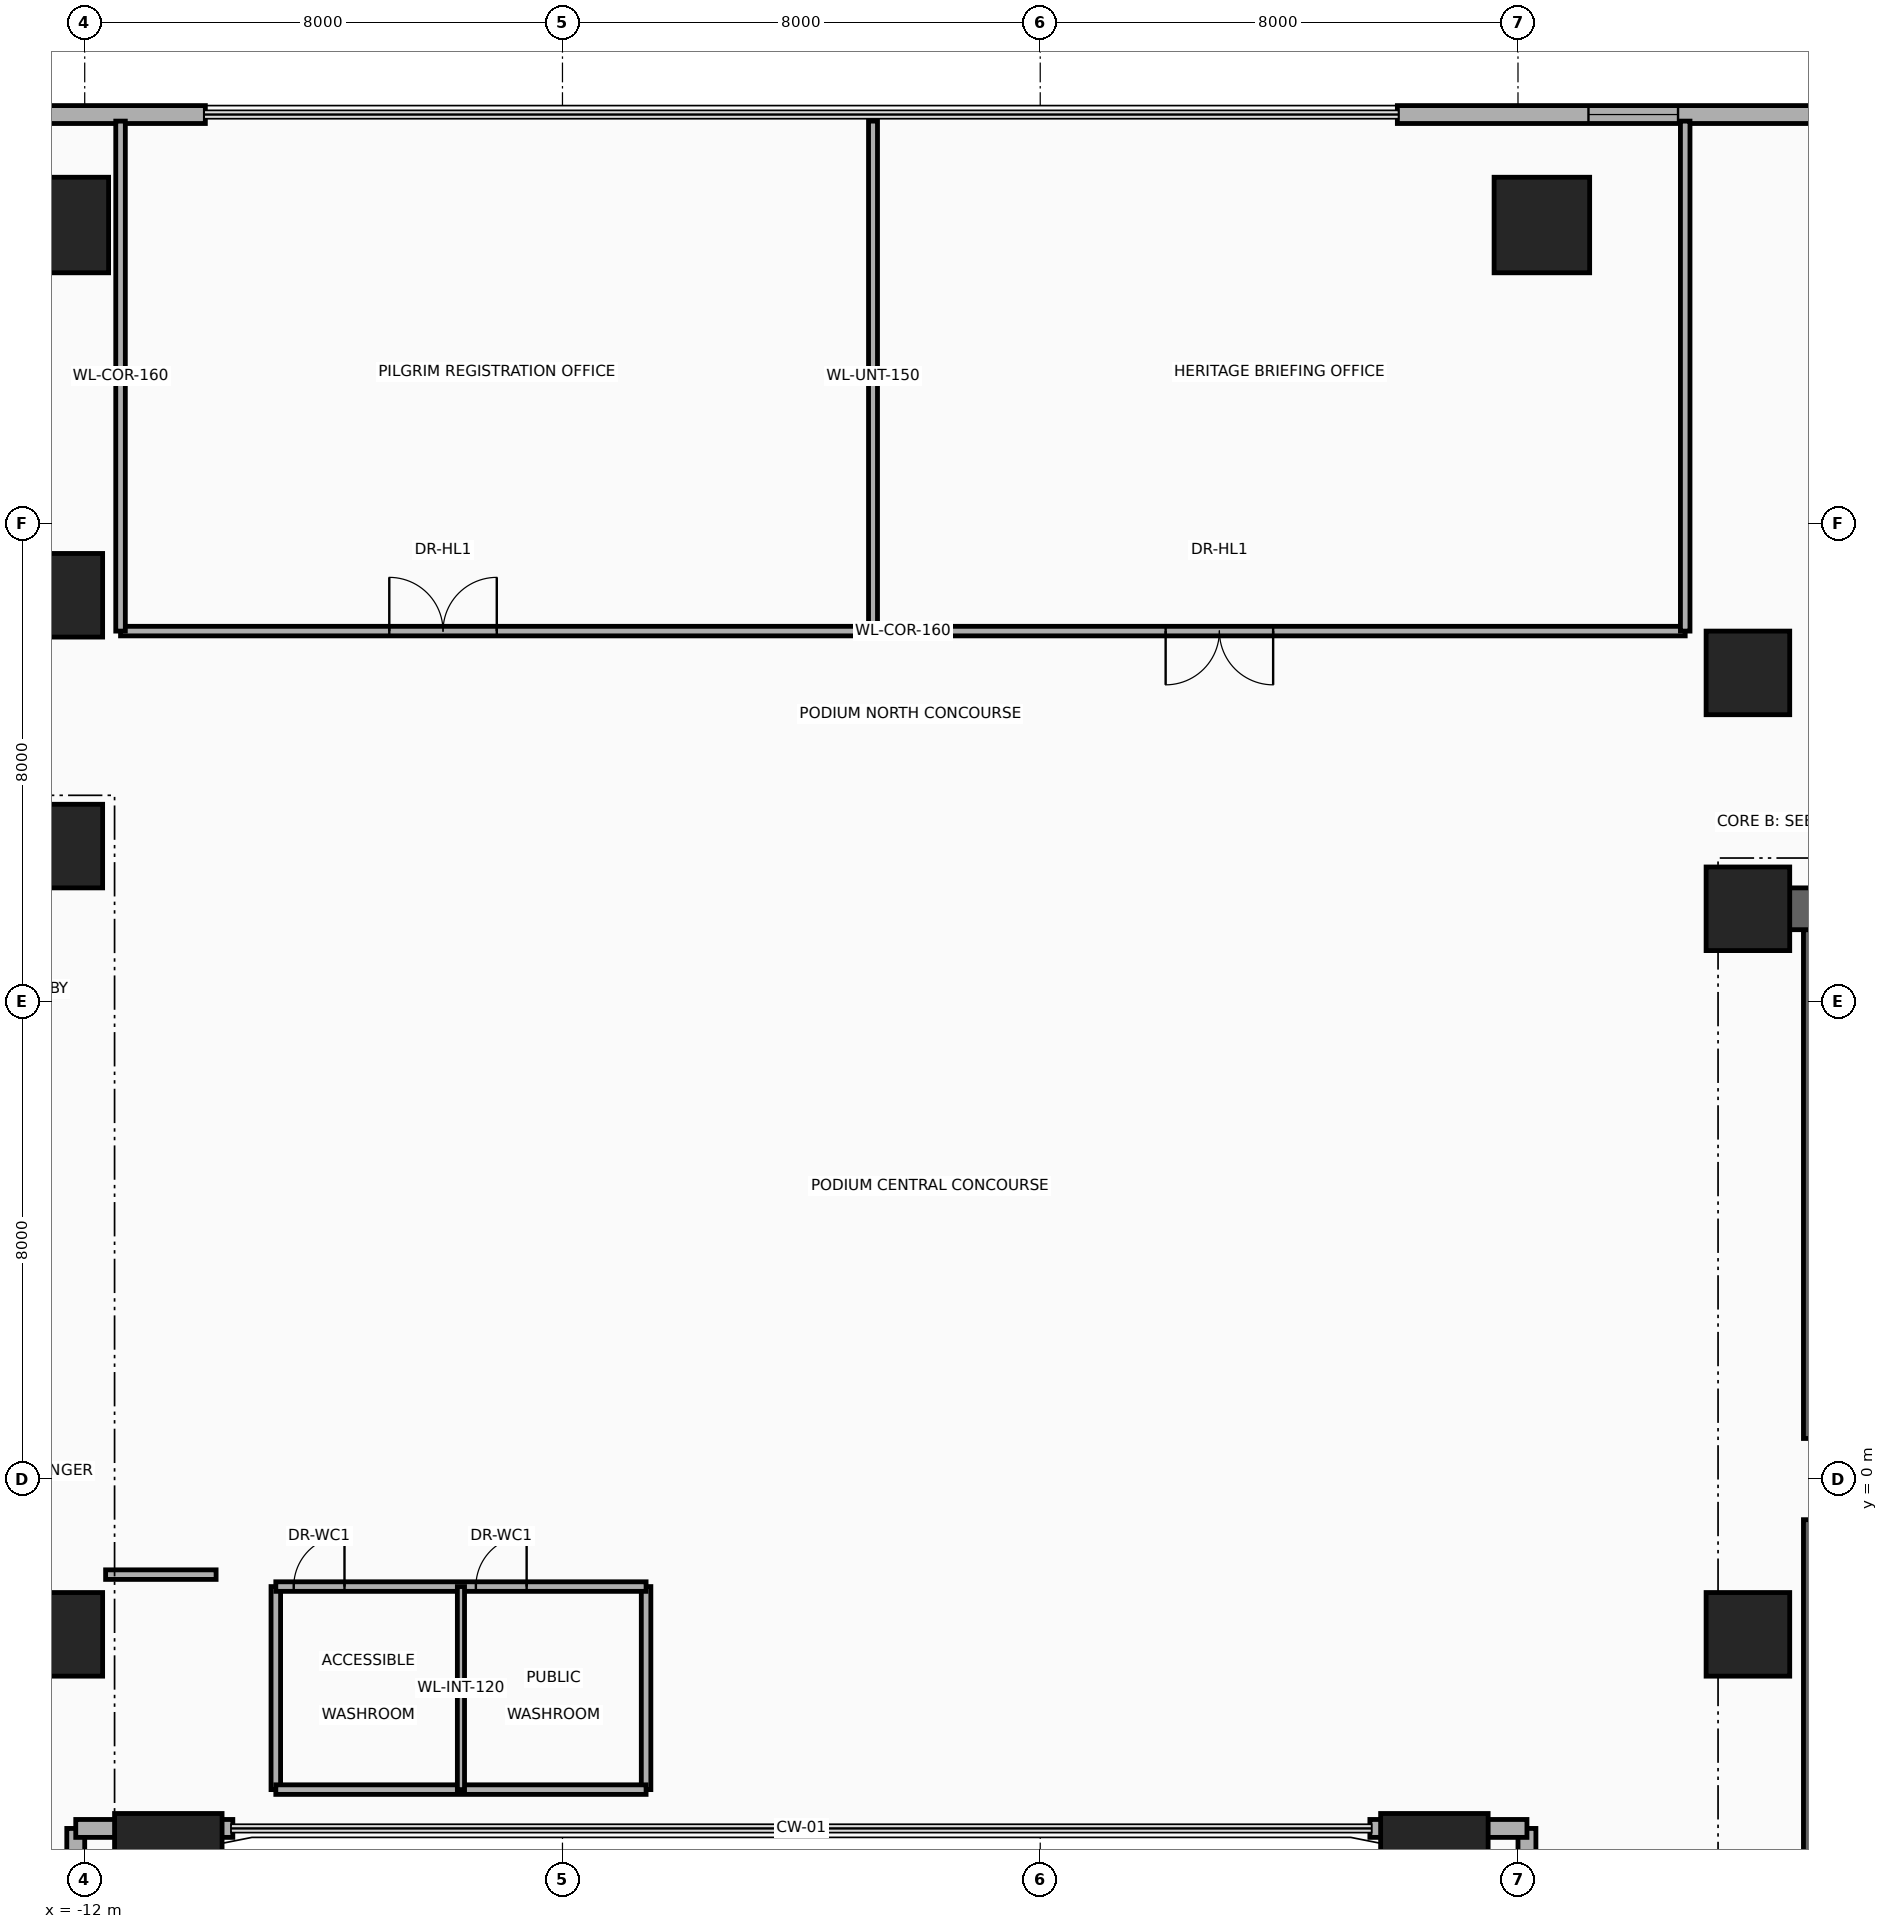
"""IFC4 building model, lengths in metres.
Left out: names, types, materials, properties, quantities, classifications, styles, units other than length and angle.
Written with IfcOpenShell. Run it as: python <this file> out.ifc"""

import sys

from ifc_helpers import new_model, si_unit, direction, frame, frame_2d, origin, origin_2d, place, context, subcontext, project, spatial, rectangle, extrude, source, transform, mapped, element, fill, save


model = new_model("IFC4")
c1 = context("Model", 3, precision=1e-05, world=origin(), true_north=direction((0.0, 1.0)))
c2 = subcontext(c1, "Body", "Model", "MODEL_VIEW")
j1 = project(units=[si_unit("LENGTHUNIT", "METRE"), si_unit("PLANEANGLEUNIT", "RADIAN")], contexts=[c1])
p1 = place(None, origin())
s1 = spatial("IfcSite", under=j1, at=p1, CompositionType="ELEMENT")
p2 = place(p1, origin())
s2 = spatial("IfcBuilding", under=s1, at=p2, CompositionType="ELEMENT")
p3 = place(p2, frame((0.0, 0.0, 5.2)))
s3 = spatial("IfcBuildingStorey", under=s2, at=p3, CompositionType="ELEMENT", Elevation=5.2)
for number, where, z_axis, x_axis in (
    (1, (16.89, 0.68, 0.0), (0.0, 0.0, 1.0), (0.0, 1.0, 0.0)),
    (2, (16.89, -9.2, 0.0), (0.0, 0.0, 1.0), (0.0, 1.0, 0.0)),
):
    element("IfcWall", number, at=place(p3, frame(where, z_axis=z_axis, x_axis=x_axis)), inside=s3, PredefinedType="SHEAR", context=c2, shape_type="SweptSolid", body=[
        extrude(rectangle(XDim=8.52, YDim=0.22, at=frame_2d((4.26, 0.0))), origin(), (0.0, 0.0, 1.0), 4.92),
    ])
p4 = place(p3, frame((-22.65, 10.8, 0.0), z_axis=(0.0, 0.0, 1.0), x_axis=(1.0, 0.0, 0.0)))
e3 = element("IfcWall", 3, at=p4, inside=s3, PredefinedType="SHEAR", context=c2, shape_type="SweptSolid", body=[
    extrude(rectangle(XDim=10.25, YDim=0.7, at=frame_2d((5.125, 0.0))), origin(), (0.0, 0.0, 1.0), 4.92),
])
p5 = place(p3, frame((15.85, 9.55, 0.0), z_axis=(0.0, 0.0, 1.0), x_axis=(1.0, 0.0, 0.0)))
e4 = element("IfcWall", 4, at=p5, inside=s3, PredefinedType="SHEAR", context=c2, shape_type="SweptSolid", body=[
    extrude(rectangle(XDim=9.0, YDim=0.7, at=frame_2d((4.5, 0.0))), origin(), (0.0, 0.0, 1.0), 4.92),
])
m1 = source(origin(), c2, "Body", "SweptSolid", [
    extrude(rectangle(XDim=1.4, YDim=1.4, at=origin_2d()), origin(), (0.0, 0.0, 1.0), 5.2),
])
for number, where, z_axis, x_axis in (
    (5, (-12.4, -2.6, 0.0), (0.0, 0.0, 1.0), (1.0, 0.0, 0.0)),
    (6, (-12.4, 10.6, 0.0), (0.0, 0.0, 1.0), (1.0, 0.0, 0.0)),
    (7, (-12.4, 14.8, 0.0), (0.0, 0.0, 1.0), (1.0, 0.0, 0.0)),
    (8, (15.85, -2.6, 0.0), (0.0, 0.0, 1.0), (1.0, 0.0, 0.0)),
    (9, (15.85, 9.55, 0.0), (0.0, 0.0, 1.0), (1.0, 0.0, 0.0)),
    (10, (15.85, 13.5, 0.0), (0.0, 0.0, 1.0), (1.0, 0.0, 0.0)),
):
    element("IfcColumn", number, at=place(p3, frame(where, z_axis=z_axis, x_axis=x_axis)), inside=s3, PredefinedType="COLUMN", context=c2, shape_type="MappedRepresentation", body=[
        mapped(m1, transform((0.0, 0.0, 0.0), x_axis=(1.0, 0.0, 0.0), y_axis=(0.0, 1.0, 0.0), z_axis=(0.0, 0.0, 1.0), scale=1.0)),
    ])
m2 = source(origin(), c2, "Body", "SweptSolid", [
    extrude(rectangle(XDim=1.8, YDim=1.8, at=origin_2d()), origin(), (0.0, 0.0, 1.0), 5.2),
])
for number, where, z_axis, x_axis in (
    (11, (-10.6, -6.5, 0.0), (0.0, 0.0, 1.0), (1.0, 0.0, 0.0)),
    (12, (10.6, -6.5, 0.0), (0.0, 0.0, 1.0), (1.0, 0.0, 0.0)),
):
    element("IfcColumn", number, at=place(p3, frame(where, z_axis=z_axis, x_axis=x_axis)), inside=s3, PredefinedType="COLUMN", context=c2, shape_type="MappedRepresentation", body=[
        mapped(m2, transform((0.0, 0.0, 0.0), x_axis=(1.0, 0.0, 0.0), y_axis=(0.0, 1.0, 0.0), z_axis=(0.0, 0.0, 1.0), scale=1.0)),
    ])
m3 = source(origin(), c2, "Body", "SweptSolid", [
    extrude(rectangle(XDim=1.6, YDim=1.6, at=origin_2d()), origin(), (0.0, 0.0, 1.0), 5.2),
])
for number, where, z_axis, x_axis in (
    (13, (-12.4, 21.0, 0.0), (0.0, 0.0, 1.0), (1.0, 0.0, 0.0)),
    (14, (12.4, 21.0, 0.0), (0.0, 0.0, 1.0), (1.0, 0.0, 0.0)),
):
    element("IfcColumn", number, at=place(p3, frame(where, z_axis=z_axis, x_axis=x_axis)), inside=s3, PredefinedType="COLUMN", context=c2, shape_type="MappedRepresentation", body=[
        mapped(m3, transform((0.0, 0.0, 0.0), x_axis=(1.0, 0.0, 0.0), y_axis=(0.0, 1.0, 0.0), z_axis=(0.0, 0.0, 1.0), scale=1.0)),
    ])
p6 = place(p3, frame((-33.85, 22.85, 0.0), z_axis=(0.0, 0.0, 1.0), x_axis=(1.0, 0.0, 0.0)))
e15 = element("IfcWall", 15, at=p6, inside=s3, PredefinedType="SOLIDWALL", context=c2, shape_type="SweptSolid", body=[
    extrude(rectangle(XDim=23.87, YDim=0.3, at=frame_2d((11.935, 0.0))), origin(), (0.0, 0.0, 1.0), 4.92),
])
p7 = place(p6, frame((3.2, 0.0, 0.9)))
e16 = element("IfcOpeningElement", 16, at=p7, cuts=e15, PredefinedType="OPENING", context=c2, shape_type="SweptSolid", body=[
    extrude(rectangle(XDim=1.5, YDim=1.75, at=frame_2d((0.75, 0.875))), frame((0.0, 0.165, 0.0), z_axis=(0.0, -1.0, 0.0), x_axis=(1.0, 0.0, 0.0)), (0.0, 0.0, 1.0), 0.33),
])
p8 = place(p6, frame((10.0, 0.0, 0.9)))
e17 = element("IfcOpeningElement", 17, at=p8, cuts=e15, PredefinedType="OPENING", context=c2, shape_type="SweptSolid", body=[
    extrude(rectangle(XDim=1.5, YDim=1.75, at=frame_2d((0.75, 0.875))), frame((0.0, 0.165, 0.0), z_axis=(0.0, -1.0, 0.0), x_axis=(1.0, 0.0, 0.0)), (0.0, 0.0, 1.0), 0.33),
])
p9 = place(p6, frame((17.8, 0.0, 0.9)))
e18 = element("IfcOpeningElement", 18, at=p9, cuts=e15, PredefinedType="OPENING", context=c2, shape_type="SweptSolid", body=[
    extrude(rectangle(XDim=1.5, YDim=1.75, at=frame_2d((0.75, 0.875))), frame((0.0, 0.165, 0.0), z_axis=(0.0, -1.0, 0.0), x_axis=(1.0, 0.0, 0.0)), (0.0, 0.0, 1.0), 0.33),
])
p10 = place(p3, frame((9.98, 22.85, 0.0), z_axis=(0.0, 0.0, 1.0), x_axis=(1.0, 0.0, 0.0)))
e19 = element("IfcWall", 19, at=p10, inside=s3, PredefinedType="SOLIDWALL", context=c2, shape_type="SweptSolid", body=[
    extrude(rectangle(XDim=23.87, YDim=0.3, at=frame_2d((11.935, 0.0))), origin(), (0.0, 0.0, 1.0), 4.92),
])
p11 = place(p10, frame((3.2, 0.0, 0.9)))
e20 = element("IfcOpeningElement", 20, at=p11, cuts=e19, PredefinedType="OPENING", context=c2, shape_type="SweptSolid", body=[
    extrude(rectangle(XDim=1.5, YDim=1.75, at=frame_2d((0.75, 0.875))), frame((0.0, 0.165, 0.0), z_axis=(0.0, -1.0, 0.0), x_axis=(1.0, 0.0, 0.0)), (0.0, 0.0, 1.0), 0.33),
])
p12 = place(p10, frame((10.0, 0.0, 0.9)))
e21 = element("IfcOpeningElement", 21, at=p12, cuts=e19, PredefinedType="OPENING", context=c2, shape_type="SweptSolid", body=[
    extrude(rectangle(XDim=1.5, YDim=1.75, at=frame_2d((0.75, 0.875))), frame((0.0, 0.165, 0.0), z_axis=(0.0, -1.0, 0.0), x_axis=(1.0, 0.0, 0.0)), (0.0, 0.0, 1.0), 0.33),
])
p13 = place(p10, frame((17.8, 0.0, 0.9)))
e22 = element("IfcOpeningElement", 22, at=p13, cuts=e19, PredefinedType="OPENING", context=c2, shape_type="SweptSolid", body=[
    extrude(rectangle(XDim=1.5, YDim=1.75, at=frame_2d((0.75, 0.875))), frame((0.0, 0.165, 0.0), z_axis=(0.0, -1.0, 0.0), x_axis=(1.0, 0.0, 0.0)), (0.0, 0.0, 1.0), 0.33),
])
for number, where, z_axis, x_axis in (
    (23, (-12.15, -22.85, 0.0), (0.0, 0.0, 1.0), (0.0, 1.0, 0.0)),
    (24, (12.15, -22.85, 0.0), (0.0, 0.0, 1.0), (0.0, 1.0, 0.0)),
):
    element("IfcWall", number, at=place(p3, frame(where, z_axis=z_axis, x_axis=x_axis)), inside=s3, PredefinedType="SOLIDWALL", context=c2, shape_type="SweptSolid", body=[
        extrude(rectangle(XDim=17.0, YDim=0.3, at=frame_2d((8.5, 0.0))), origin(), (0.0, 0.0, 1.0), 3.957),
    ])
for number, where, z_axis, x_axis in (
    (25, (-12.15, -5.85, 0.0), (0.0, 0.0, 1.0), (1.0, 0.0, 0.0)),
    (26, (9.52, -5.85, 0.0), (0.0, 0.0, 1.0), (1.0, 0.0, 0.0)),
):
    element("IfcWall", number, at=place(p3, frame(where, z_axis=z_axis, x_axis=x_axis)), inside=s3, PredefinedType="SOLIDWALL", context=c2, shape_type="SweptSolid", body=[
        extrude(rectangle(XDim=2.63, YDim=0.3, at=frame_2d((1.315, 0.0))), origin(), (0.0, 0.0, 1.0), 4.92),
    ])
p14 = place(p3, frame((-11.4, 14.2, 0.0), z_axis=(0.0, 0.0, 1.0), x_axis=(1.0, 0.0, 0.0)))
e27 = element("IfcWall", 27, at=p14, inside=s3, PredefinedType="PARTITIONING", context=c2, shape_type="SweptSolid", body=[
    extrude(rectangle(XDim=26.2, YDim=0.16, at=frame_2d((13.1, 0.0))), origin(), (0.0, 0.0, 1.0), 4.92),
])
p15 = place(p14, frame((4.5, 0.0, 0.0)))
e28 = element("IfcOpeningElement", 28, at=p15, cuts=e27, PredefinedType="OPENING", context=c2, shape_type="SweptSolid", body=[
    extrude(rectangle(XDim=1.8, YDim=2.15, at=frame_2d((0.9, 1.075))), frame((0.0, 0.095, 0.0), z_axis=(0.0, -1.0, 0.0), x_axis=(1.0, 0.0, 0.0)), (0.0, 0.0, 1.0), 0.19),
])
p16 = place(p14, frame((17.5, 0.0, 0.0)))
e29 = element("IfcOpeningElement", 29, at=p16, cuts=e27, PredefinedType="OPENING", context=c2, shape_type="SweptSolid", body=[
    extrude(rectangle(XDim=1.8, YDim=2.15, at=frame_2d((0.9, 1.075))), frame((0.0, 0.095, 0.0), z_axis=(0.0, -1.0, 0.0), x_axis=(1.0, 0.0, 0.0)), (0.0, 0.0, 1.0), 0.19),
])
for number, where, z_axis, x_axis in (
    (30, (-11.4, 14.2, 0.0), (0.0, 0.0, 1.0), (0.0, 1.0, 0.0)),
    (31, (14.8, 14.2, 0.0), (0.0, 0.0, 1.0), (0.0, 1.0, 0.0)),
):
    element("IfcWall", number, at=place(p3, frame(where, z_axis=z_axis, x_axis=x_axis)), inside=s3, PredefinedType="PARTITIONING", context=c2, shape_type="SweptSolid", body=[
        extrude(rectangle(XDim=8.54, YDim=0.16, at=frame_2d((4.27, 0.0))), origin(), (0.0, 0.0, 1.0), 3.957),
    ])
p17 = place(p3, frame((1.2, 14.2, 0.0), z_axis=(0.0, 0.0, 1.0), x_axis=(0.0, 1.0, 0.0)))
e32 = element("IfcWall", 32, at=p17, inside=s3, PredefinedType="PARTITIONING", context=c2, shape_type="SweptSolid", body=[
    extrude(rectangle(XDim=8.54, YDim=0.15, at=frame_2d((4.27, 0.0))), origin(), (0.0, 0.0, 1.0), 3.957),
])
for number, where, z_axis, x_axis in (
    (33, (-8.8, -5.2, 0.0), (0.0, 0.0, 1.0), (0.0, 1.0, 0.0)),
    (34, (-2.6, -5.2, 0.0), (0.0, 0.0, 1.0), (0.0, 1.0, 0.0)),
):
    element("IfcWall", number, at=place(p3, frame(where, z_axis=z_axis, x_axis=x_axis)), inside=s3, PredefinedType="PARTITIONING", context=c2, shape_type="SweptSolid", body=[
        extrude(rectangle(XDim=3.4, YDim=0.16, at=frame_2d((1.7, 0.0))), origin(), (0.0, 0.0, 1.0), 4.92),
    ])
p18 = place(p3, frame((-8.8, -5.2, 0.0), z_axis=(0.0, 0.0, 1.0), x_axis=(1.0, 0.0, 0.0)))
e35 = element("IfcWall", 35, at=p18, inside=s3, PredefinedType="PARTITIONING", context=c2, shape_type="SweptSolid", body=[
    extrude(rectangle(XDim=6.2, YDim=0.16, at=frame_2d((3.1, 0.0))), origin(), (0.0, 0.0, 1.0), 4.92),
])
p19 = place(p3, frame((-8.8, -1.8, 0.0), z_axis=(0.0, 0.0, 1.0), x_axis=(1.0, 0.0, 0.0)))
e36 = element("IfcWall", 36, at=p19, inside=s3, PredefinedType="PARTITIONING", context=c2, shape_type="SweptSolid", body=[
    extrude(rectangle(XDim=6.2, YDim=0.16, at=frame_2d((3.1, 0.0))), origin(), (0.0, 0.0, 1.0), 4.92),
])
p20 = place(p19, frame((0.3, 0.0, 0.0)))
e37 = element("IfcOpeningElement", 37, at=p20, cuts=e36, PredefinedType="OPENING", context=c2, shape_type="SweptSolid", body=[
    extrude(rectangle(XDim=0.85, YDim=2.1, at=frame_2d((0.425, 1.05))), frame((0.0, 0.095, 0.0), z_axis=(0.0, -1.0, 0.0), x_axis=(1.0, 0.0, 0.0)), (0.0, 0.0, 1.0), 0.19),
])
p21 = place(p19, frame((3.35, 0.0, 0.0)))
e38 = element("IfcOpeningElement", 38, at=p21, cuts=e36, PredefinedType="OPENING", context=c2, shape_type="SweptSolid", body=[
    extrude(rectangle(XDim=0.85, YDim=2.1, at=frame_2d((0.425, 1.05))), frame((0.0, 0.095, 0.0), z_axis=(0.0, -1.0, 0.0), x_axis=(1.0, 0.0, 0.0)), (0.0, 0.0, 1.0), 0.19),
])
p22 = place(p3, frame((-5.7, -5.2, 0.0), z_axis=(0.0, 0.0, 1.0), x_axis=(0.0, 1.0, 0.0)))
e39 = element("IfcWall", 39, at=p22, inside=s3, PredefinedType="PARTITIONING", context=c2, shape_type="SweptSolid", body=[
    extrude(rectangle(XDim=3.4, YDim=0.12, at=frame_2d((1.7, 0.0))), origin(), (0.0, 0.0, 1.0), 4.92),
])
p23 = place(p3, frame((-11.65, -1.6, 0.0), z_axis=(0.0, 0.0, 1.0), x_axis=(1.0, 0.0, 0.0)))
e40 = element("IfcWall", 40, at=p23, inside=s3, PredefinedType="PARTITIONING", context=c2, shape_type="SweptSolid", body=[
    extrude(rectangle(XDim=1.85, YDim=0.16, at=frame_2d((0.925, 0.0))), origin(), (0.0, 0.0, 1.0), 4.92),
])
p24 = place(p11, origin())
e41 = element("IfcWindow", 41, at=p24, inside=s3, PartitioningType="SINGLE_PANEL", PredefinedType="WINDOW", context=c2, shape_type="SweptSolid", body=[
    extrude(rectangle(XDim=1.5, YDim=1.75, at=frame_2d((0.75, 0.875))), frame((0.0, 0.03, 0.0), z_axis=(0.0, -1.0, 0.0), x_axis=(1.0, 0.0, 0.0)), (0.0, 0.0, 1.0), 0.06),
])
fill(e20, e41)
p25 = place(p15, origin())
e42 = element("IfcDoor", 42, at=p25, inside=s3, OperationType="DOUBLE_DOOR_SINGLE_SWING", PredefinedType="DOOR", context=c2, shape_type="SweptSolid", body=[
    extrude(rectangle(XDim=1.8, YDim=2.15, at=frame_2d((0.9, 1.075))), frame((0.0, 0.025, 0.0), z_axis=(0.0, -1.0, 0.0), x_axis=(1.0, 0.0, 0.0)), (0.0, 0.0, 1.0), 0.05),
])
fill(e28, e42)
p26 = place(p16, frame((1.8, 0.0, 0.0), z_axis=(0.0, 0.0, 1.0), x_axis=(-1.0, 0.0, 0.0)))
e43 = element("IfcDoor", 43, at=p26, inside=s3, OperationType="DOUBLE_DOOR_SINGLE_SWING", PredefinedType="DOOR", context=c2, shape_type="SweptSolid", body=[
    extrude(rectangle(XDim=1.8, YDim=2.15, at=frame_2d((0.9, 1.075))), frame((0.0, 0.025, 0.0), z_axis=(0.0, -1.0, 0.0), x_axis=(1.0, 0.0, 0.0)), (0.0, 0.0, 1.0), 0.05),
])
fill(e29, e43)
p27 = place(p20, origin())
e44 = element("IfcDoor", 44, at=p27, inside=s3, OperationType="SINGLE_SWING_RIGHT", PredefinedType="DOOR", context=c2, shape_type="SweptSolid", body=[
    extrude(rectangle(XDim=0.85, YDim=2.1, at=frame_2d((0.425, 1.05))), frame((0.0, 0.025, 0.0), z_axis=(0.0, -1.0, 0.0), x_axis=(1.0, 0.0, 0.0)), (0.0, 0.0, 1.0), 0.05),
])
fill(e37, e44)
p28 = place(p21, origin())
e45 = element("IfcDoor", 45, at=p28, inside=s3, OperationType="SINGLE_SWING_LEFT", PredefinedType="DOOR", context=c2, shape_type="SweptSolid", body=[
    extrude(rectangle(XDim=0.85, YDim=2.1, at=frame_2d((0.425, 1.05))), frame((0.0, 0.025, 0.0), z_axis=(0.0, -1.0, 0.0), x_axis=(1.0, 0.0, 0.0)), (0.0, 0.0, 1.0), 0.05),
])
fill(e38, e45)
save(model, sys.argv[1])
